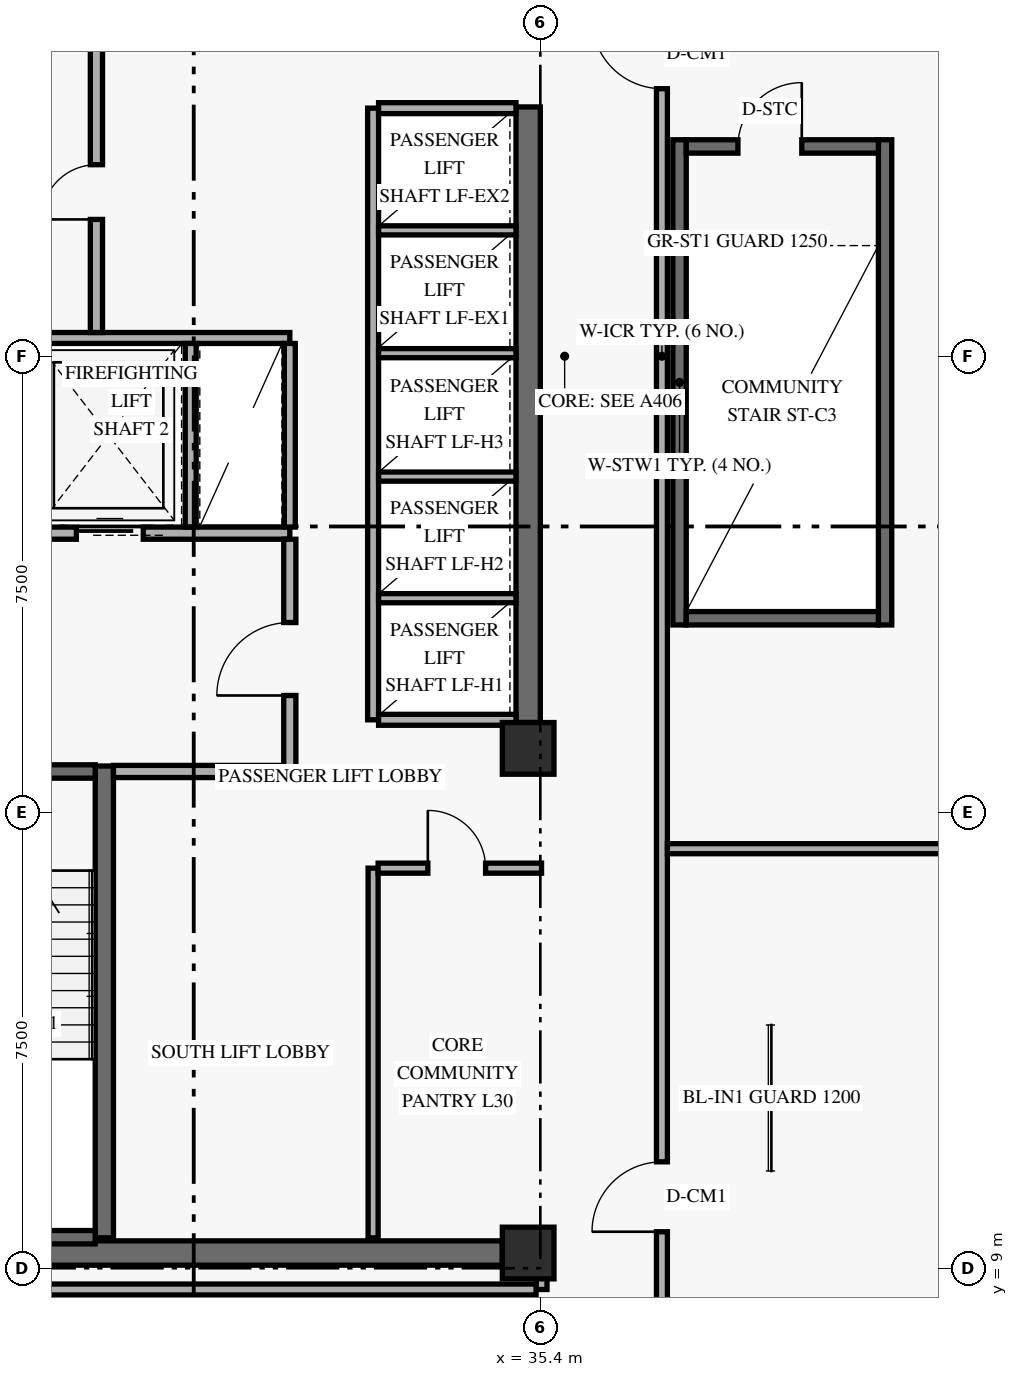
"""IFC4 building model, lengths in metres.
Left out: names, types, materials, properties, quantities, classifications, styles, units other than length and angle.
Written with IfcOpenShell. Run it as: python <this file> out.ifc"""

import sys

from ifc_helpers import new_model, si_unit, direction, frame, frame_2d, origin, origin_2d, place, context, subcontext, project, spatial, rectangle, extrude, element, fill, save


model = new_model("IFC4")
c1 = context("Model", 3, precision=1e-05, world=origin(), true_north=direction((0.0, 1.0)))
c2 = subcontext(c1, "Body", "Model", "MODEL_VIEW")
j1 = project(units=[si_unit("LENGTHUNIT", "METRE"), si_unit("PLANEANGLEUNIT", "RADIAN")], contexts=[c1])
p1 = place(None, origin())
s1 = spatial("IfcSite", under=j1, at=p1, CompositionType="ELEMENT")
p2 = place(p1, origin())
s2 = spatial("IfcBuilding", under=s1, at=p2, CompositionType="ELEMENT")
p3 = place(p2, frame((0.0, 0.0, 117.0)))
s3 = spatial("IfcBuildingStorey", under=s2, at=p3, CompositionType="ELEMENT", Elevation=117.0)
p4 = place(p3, frame((35.2, 17.975, 0.0), z_axis=(0.0, 0.0, 1.0), x_axis=(0.0, 1.0, 0.0)))
e1 = element("IfcWall", 1, at=p4, inside=s3, PredefinedType="SHEAR", context=c2, shape_type="SweptSolid", body=[
    extrude(rectangle(XDim=10.125, YDim=0.4, at=frame_2d((5.062, 0.0))), origin(), (0.0, 0.0, 1.0), 3.349),
])
p5 = place(p3, frame((24.625, 9.25, 0.0), z_axis=(0.0, 0.0, 1.0), x_axis=(1.0, 0.0, 0.0)))
e2 = element("IfcWall", 2, at=p5, inside=s3, PredefinedType="SHEAR", context=c2, shape_type="SweptSolid", body=[
    extrude(rectangle(XDim=10.15, YDim=0.4, at=frame_2d((5.075, 0.0))), origin(), (0.0, 0.0, 1.0), 3.96),
])
p6 = place(p3, frame((28.23, 9.5, 0.0), z_axis=(0.0, 0.0, 1.0), x_axis=(0.0, 1.0, 0.0)))
e3 = element("IfcWall", 3, at=p6, inside=s3, PredefinedType="SHEAR", context=c2, shape_type="SweptSolid", body=[
    extrude(rectangle(XDim=7.76, YDim=0.3, at=frame_2d((3.88, 0.0))), origin(), (0.0, 0.0, 1.0), 3.96),
])
p7 = place(p3, frame((24.92, 9.51, 0.0), z_axis=(0.0, 0.0, 1.0), x_axis=(1.0, 0.0, 0.0)))
e4 = element("IfcWall", 4, at=p7, inside=s3, PredefinedType="SHEAR", context=c2, shape_type="SweptSolid", body=[
    extrude(rectangle(XDim=3.16, YDim=0.22, at=frame_2d((1.58, 0.0))), origin(), (0.0, 0.0, 1.0), 3.96),
])
p8 = place(p3, frame((24.92, 17.17, 0.0), z_axis=(0.0, 0.0, 1.0), x_axis=(1.0, 0.0, 0.0)))
e5 = element("IfcWall", 5, at=p8, inside=s3, PredefinedType="SHEAR", context=c2, shape_type="SweptSolid", body=[
    extrude(rectangle(XDim=3.16, YDim=0.22, at=frame_2d((1.58, 0.0))), origin(), (0.0, 0.0, 1.0), 3.96),
])
p9 = place(p8, frame((0.78, 0.0, 0.0)))
e6 = element("IfcOpeningElement", 6, at=p9, cuts=e5, PredefinedType="OPENING", context=c2, shape_type="SweptSolid", body=[
    extrude(rectangle(XDim=1.05, YDim=2.15, at=frame_2d((0.525, 1.075))), frame((0.0, 0.12, 0.0), z_axis=(0.0, -1.0, 0.0), x_axis=(1.0, 0.0, 0.0)), (0.0, 0.0, 1.0), 0.24),
])
for number, where, z_axis, x_axis in (
    (7, (37.69, 19.58, 0.0), (0.0, 0.0, 1.0), (0.0, 1.0, 0.0)),
    (8, (41.07, 19.58, 0.0), (0.0, 0.0, 1.0), (0.0, 1.0, 0.0)),
):
    element("IfcWall", number, at=place(p3, frame(where, z_axis=z_axis, x_axis=x_axis)), inside=s3, PredefinedType="SHEAR", context=c2, shape_type="SweptSolid", body=[
        extrude(rectangle(XDim=7.98, YDim=0.22, at=frame_2d((3.99, 0.0))), origin(), (0.0, 0.0, 1.0), 3.96),
    ])
p10 = place(p3, frame((37.8, 19.69, 0.0), z_axis=(0.0, 0.0, 1.0), x_axis=(1.0, 0.0, 0.0)))
e9 = element("IfcWall", 9, at=p10, inside=s3, PredefinedType="SHEAR", context=c2, shape_type="SweptSolid", body=[
    extrude(rectangle(XDim=3.16, YDim=0.22, at=frame_2d((1.58, 0.0))), origin(), (0.0, 0.0, 1.0), 3.96),
])
p11 = place(p3, frame((37.8, 27.45, 0.0), z_axis=(0.0, 0.0, 1.0), x_axis=(1.0, 0.0, 0.0)))
e10 = element("IfcWall", 10, at=p11, inside=s3, PredefinedType="SHEAR", context=c2, shape_type="SweptSolid", body=[
    extrude(rectangle(XDim=3.16, YDim=0.22, at=frame_2d((1.58, 0.0))), origin(), (0.0, 0.0, 1.0), 3.96),
])
p12 = place(p11, frame((0.85, 0.0, 0.0)))
e11 = element("IfcOpeningElement", 11, at=p12, cuts=e10, PredefinedType="OPENING", context=c2, shape_type="SweptSolid", body=[
    extrude(rectangle(XDim=1.05, YDim=2.15, at=frame_2d((0.525, 1.075))), frame((0.0, 0.12, 0.0), z_axis=(0.0, -1.0, 0.0), x_axis=(1.0, 0.0, 0.0)), (0.0, 0.0, 1.0), 0.24),
])
for number, where, z_axis, x_axis in (
    (12, (35.2, 9.25, 0.0), (0.0, 0.0, 1.0), (1.0, 0.0, 0.0)),
    (13, (35.2, 17.55, 0.0), (0.0, 0.0, 1.0), (1.0, 0.0, 0.0)),
):
    element("IfcColumn", number, at=place(p3, frame(where, z_axis=z_axis, x_axis=x_axis)), inside=s3, PredefinedType="COLUMN", context=c2, shape_type="SweptSolid", body=[
        extrude(rectangle(XDim=0.85, YDim=0.85, at=origin_2d()), origin(), (0.0, 0.0, 1.0), 4.2),
    ])
p13 = place(p3, frame((24.45, 21.09, 0.0), z_axis=(0.0, 0.0, 1.0), x_axis=(1.0, 0.0, 0.0)))
e14 = element("IfcWall", 14, at=p13, inside=s3, PredefinedType="STANDARD", context=c2, shape_type="SweptSolid", body=[
    extrude(rectangle(XDim=6.83, YDim=0.2, at=frame_2d((3.415, 0.0))), origin(), (0.0, 0.0, 1.0), 3.96),
])
p14 = place(p13, frame((0.72, 0.0, 0.0)))
e15 = element("IfcOpeningElement", 15, at=p14, cuts=e14, PredefinedType="OPENING", context=c2, shape_type="SweptSolid", body=[
    extrude(rectangle(XDim=1.1, YDim=2.2, at=frame_2d((0.55, 1.1))), frame((0.0, 0.11, 0.0), z_axis=(0.0, -1.0, 0.0), x_axis=(1.0, 0.0, 0.0)), (0.0, 0.0, 1.0), 0.22),
])
p15 = place(p13, frame((3.32, 0.0, 0.0)))
e16 = element("IfcOpeningElement", 16, at=p15, cuts=e14, PredefinedType="OPENING", context=c2, shape_type="SweptSolid", body=[
    extrude(rectangle(XDim=1.1, YDim=2.2, at=frame_2d((0.55, 1.1))), frame((0.0, 0.11, 0.0), z_axis=(0.0, -1.0, 0.0), x_axis=(1.0, 0.0, 0.0)), (0.0, 0.0, 1.0), 0.22),
])
p16 = place(p3, frame((28.38, 17.17, 0.0), z_axis=(0.0, 0.0, 1.0), x_axis=(1.0, 0.0, 0.0)))
e17 = element("IfcWall", 17, at=p16, inside=s3, PredefinedType="STANDARD", context=c2, shape_type="SweptSolid", body=[
    extrude(rectangle(XDim=2.9, YDim=0.2, at=frame_2d((1.45, 0.0))), origin(), (0.0, 0.0, 1.0), 3.96),
])
p17 = place(p3, frame((31.28, 17.07, 0.0), z_axis=(0.0, 0.0, 1.0), x_axis=(0.0, 1.0, 0.0)))
e18 = element("IfcWall", 18, at=p17, inside=s3, PredefinedType="STANDARD", context=c2, shape_type="SweptSolid", body=[
    extrude(rectangle(XDim=3.92, YDim=0.2, at=frame_2d((1.96, 0.0))), origin(), (0.0, 0.0, 1.0), 3.331),
])
p18 = place(p17, frame((1.35, 0.0, 0.0)))
e19 = element("IfcOpeningElement", 19, at=p18, cuts=e18, PredefinedType="OPENING", context=c2, shape_type="SweptSolid", body=[
    extrude(rectangle(XDim=1.2, YDim=2.15, at=frame_2d((0.6, 1.075))), frame((0.0, 0.11, 0.0), z_axis=(0.0, -1.0, 0.0), x_axis=(1.0, 0.0, 0.0)), (0.0, 0.0, 1.0), 0.22),
])
p19 = place(p3, frame((24.45, 24.3, 0.0), z_axis=(0.0, 0.0, 1.0), x_axis=(1.0, 0.0, 0.0)))
e20 = element("IfcWall", 20, at=p19, inside=s3, PredefinedType="STANDARD", context=c2, shape_type="SweptSolid", body=[
    extrude(rectangle(XDim=6.83, YDim=0.18, at=frame_2d((3.415, 0.0))), origin(), (0.0, 0.0, 1.0), 3.96),
])
for number, where, z_axis, x_axis in (
    (21, (29.65, 21.19, 0.0), (0.0, 0.0, 1.0), (0.0, 1.0, 0.0)),
    (22, (31.28, 21.19, 0.0), (0.0, 0.0, 1.0), (0.0, 1.0, 0.0)),
):
    element("IfcWall", number, at=place(p3, frame(where, z_axis=z_axis, x_axis=x_axis)), inside=s3, PredefinedType="STANDARD", context=c2, shape_type="SweptSolid", body=[
        extrude(rectangle(XDim=3.02, YDim=0.18, at=frame_2d((1.51, 0.0))), origin(), (0.0, 0.0, 1.0), 3.96),
    ])
p20 = place(p3, frame((28.1, 24.39, 0.0), z_axis=(0.0, 0.0, 1.0), x_axis=(0.0, 1.0, 0.0)))
e23 = element("IfcWall", 23, at=p20, inside=s3, PredefinedType="STANDARD", context=c2, shape_type="SweptSolid", body=[
    extrude(rectangle(XDim=4.75, YDim=0.2, at=frame_2d((2.375, 0.0))), origin(), (0.0, 0.0, 1.0), 3.96),
])
p21 = place(p20, frame((1.86, 0.0, 0.0)))
e24 = element("IfcOpeningElement", 24, at=p21, cuts=e23, PredefinedType="OPENING", context=c2, shape_type="SweptSolid", body=[
    extrude(rectangle(XDim=0.9, YDim=2.1, at=frame_2d((0.45, 1.05))), frame((0.0, 0.11, 0.0), z_axis=(0.0, -1.0, 0.0), x_axis=(1.0, 0.0, 0.0)), (0.0, 0.0, 1.0), 0.22),
])
p22 = place(p3, frame((32.65, 18.02, 0.0), z_axis=(0.0, 0.0, 1.0), x_axis=(0.0, 1.0, 0.0)))
e25 = element("IfcWall", 25, at=p22, inside=s3, PredefinedType="STANDARD", context=c2, shape_type="SweptSolid", body=[
    extrude(rectangle(XDim=10.06, YDim=0.18, at=frame_2d((5.03, 0.0))), origin(), (0.0, 0.0, 1.0), 3.96),
])
for number, where, z_axis, x_axis in (
    (26, (32.74, 18.02, 0.0), (0.0, 0.0, 1.0), (1.0, 0.0, 0.0)),
    (27, (32.74, 28.08, 0.0), (0.0, 0.0, 1.0), (1.0, 0.0, 0.0)),
):
    element("IfcWall", number, at=place(p3, frame(where, z_axis=z_axis, x_axis=x_axis)), inside=s3, PredefinedType="STANDARD", context=c2, shape_type="SweptSolid", body=[
        extrude(rectangle(XDim=2.26, YDim=0.18, at=frame_2d((1.13, 0.0))), origin(), (0.0, 0.0, 1.0), 3.96),
    ])
for number, where, z_axis, x_axis in (
    (28, (32.74, 20.02, 0.0), (0.0, 0.0, 1.0), (1.0, 0.0, 0.0)),
    (29, (32.74, 22.02, 0.0), (0.0, 0.0, 1.0), (1.0, 0.0, 0.0)),
    (30, (32.74, 24.05, 0.0), (0.0, 0.0, 1.0), (1.0, 0.0, 0.0)),
    (31, (32.74, 26.07, 0.0), (0.0, 0.0, 1.0), (1.0, 0.0, 0.0)),
):
    element("IfcWall", number, at=place(p3, frame(where, z_axis=z_axis, x_axis=x_axis)), inside=s3, PredefinedType="STANDARD", context=c2, shape_type="SweptSolid", body=[
        extrude(rectangle(XDim=2.26, YDim=0.15, at=frame_2d((1.13, 0.0))), origin(), (0.0, 0.0, 1.0), 3.96),
    ])
p23 = place(p3, frame((37.4, 6.8, 0.0), z_axis=(0.0, 0.0, 1.0), x_axis=(0.0, 1.0, 0.0)))
e32 = element("IfcWall", 32, at=p23, inside=s3, PredefinedType="STANDARD", context=c2, shape_type="SweptSolid", body=[
    extrude(rectangle(XDim=34.4, YDim=0.18, at=frame_2d((17.2, 0.0))), origin(), (0.0, 0.0, 1.0), 3.331),
])
p24 = place(p23, frame((25.57, 0.0, 0.0)))
e33 = element("IfcOpeningElement", 33, at=p24, cuts=e32, PredefinedType="OPENING", context=c2, shape_type="SweptSolid", body=[
    extrude(rectangle(XDim=0.92, YDim=2.14, at=frame_2d((0.46, 1.07))), frame((0.0, 0.1, 0.0), z_axis=(0.0, -1.0, 0.0), x_axis=(1.0, 0.0, 0.0)), (0.0, 0.0, 1.0), 0.2),
])
p25 = place(p23, frame((32.46, 0.0, 0.0)))
e34 = element("IfcOpeningElement", 34, at=p25, cuts=e32, PredefinedType="OPENING", context=c2, shape_type="SweptSolid", body=[
    extrude(rectangle(XDim=0.95, YDim=2.14, at=frame_2d((0.475, 1.07))), frame((0.0, 0.1, 0.0), z_axis=(0.0, -1.0, 0.0), x_axis=(1.0, 0.0, 0.0)), (0.0, 0.0, 1.0), 0.2),
])
p26 = place(p23, frame((2.8, 0.0, 0.0)))
e35 = element("IfcOpeningElement", 35, at=p26, cuts=e32, PredefinedType="OPENING", context=c2, shape_type="SweptSolid", body=[
    extrude(rectangle(XDim=1.15, YDim=2.15, at=frame_2d((0.575, 1.075))), frame((0.0, 0.1, 0.0), z_axis=(0.0, -1.0, 0.0), x_axis=(1.0, 0.0, 0.0)), (0.0, 0.0, 1.0), 0.2),
])
p27 = place(p23, frame((21.6, 0.0, 0.0)))
e36 = element("IfcOpeningElement", 36, at=p27, cuts=e32, PredefinedType="OPENING", context=c2, shape_type="SweptSolid", body=[
    extrude(rectangle(XDim=1.15, YDim=2.15, at=frame_2d((0.575, 1.075))), frame((0.0, 0.1, 0.0), z_axis=(0.0, -1.0, 0.0), x_axis=(1.0, 0.0, 0.0)), (0.0, 0.0, 1.0), 0.2),
])
p28 = place(p3, frame((35.42, 8.65, 0.0), z_axis=(0.0, 0.0, 1.0), x_axis=(0.0, 1.0, 0.0)))
e37 = element("IfcWall", 37, at=p28, inside=s3, PredefinedType="STANDARD", context=c2, shape_type="SweptSolid", body=[
    extrude(rectangle(XDim=0.6, YDim=0.18, at=frame_2d((0.3, 0.0))), origin(), (0.0, 0.0, 1.0), 3.331),
])
p29 = place(p3, frame((37.49, 15.9, 0.0), z_axis=(0.0, 0.0, 1.0), x_axis=(1.0, 0.0, 0.0)))
e38 = element("IfcWall", 38, at=p29, inside=s3, PredefinedType="PARTITIONING", context=c2, shape_type="SweptSolid", body=[
    extrude(rectangle(XDim=15.83, YDim=0.165, at=frame_2d((7.915, 0.0))), origin(), (0.0, 0.0, 1.0), 3.331),
])
p30 = place(p3, frame((32.65, 9.5, 0.0), z_axis=(0.0, 0.0, 1.0), x_axis=(0.0, 1.0, 0.0)))
e39 = element("IfcWall", 39, at=p30, inside=s3, PredefinedType="PARTITIONING", context=c2, shape_type="SweptSolid", body=[
    extrude(rectangle(XDim=6.08, YDim=0.165, at=frame_2d((3.04, 0.0))), origin(), (0.0, 0.0, 1.0), 3.96),
])
p31 = place(p3, frame((32.732, 15.58, 0.0), z_axis=(0.0, 0.0, 1.0), x_axis=(1.0, 0.0, 0.0)))
e40 = element("IfcWall", 40, at=p31, inside=s3, PredefinedType="PARTITIONING", context=c2, shape_type="SweptSolid", body=[
    extrude(rectangle(XDim=2.688, YDim=0.165, at=frame_2d((1.344, 0.0))), origin(), (0.0, 0.0, 1.0), 3.331),
])
p32 = place(p31, frame((0.817, 0.0, 0.0)))
e41 = element("IfcOpeningElement", 41, at=p32, cuts=e40, PredefinedType="OPENING", context=c2, shape_type="SweptSolid", body=[
    extrude(rectangle(XDim=0.95, YDim=2.15, at=frame_2d((0.475, 1.075))), frame((0.0, 0.093, 0.0), z_axis=(0.0, -1.0, 0.0), x_axis=(1.0, 0.0, 0.0)), (0.0, 0.0, 1.0), 0.185),
])
p33 = place(p3, frame((23.85, 8.65, 0.0), z_axis=(0.0, 0.0, 1.0), x_axis=(1.0, 0.0, 0.0)))
e42 = element("IfcWall", 42, at=p33, inside=s3, PredefinedType="STANDARD", context=c2, shape_type="SweptSolid", body=[
    extrude(rectangle(XDim=11.48, YDim=0.18, at=frame_2d((5.74, 0.0))), origin(), (0.0, 0.0, 1.0), 3.331),
])
p34 = place(p15, origin())
e43 = element("IfcDoor", 43, at=p34, inside=s3, OperationType="SLIDING_TO_LEFT", PredefinedType="DOOR", context=c2, shape_type="SweptSolid", body=[
    extrude(rectangle(XDim=1.1, YDim=2.2, at=frame_2d((0.55, 1.1))), frame((0.0, 0.025, 0.0), z_axis=(0.0, -1.0, 0.0), x_axis=(1.0, 0.0, 0.0)), (0.0, 0.0, 1.0), 0.05),
])
fill(e16, e43)
p35 = place(p18, origin())
e44 = element("IfcDoor", 44, at=p35, inside=s3, OperationType="SINGLE_SWING_LEFT", PredefinedType="DOOR", context=c2, shape_type="SweptSolid", body=[
    extrude(rectangle(XDim=1.2, YDim=2.15, at=frame_2d((0.6, 1.075))), frame((0.0, 0.025, 0.0), z_axis=(0.0, -1.0, 0.0), x_axis=(1.0, 0.0, 0.0)), (0.0, 0.0, 1.0), 0.05),
])
fill(e19, e44)
p36 = place(p21, origin())
e45 = element("IfcDoor", 45, at=p36, inside=s3, OperationType="SINGLE_SWING_LEFT", PredefinedType="DOOR", context=c2, shape_type="SweptSolid", body=[
    extrude(rectangle(XDim=0.9, YDim=2.1, at=frame_2d((0.45, 1.05))), frame((0.0, 0.025, 0.0), z_axis=(0.0, -1.0, 0.0), x_axis=(1.0, 0.0, 0.0)), (0.0, 0.0, 1.0), 0.05),
])
fill(e24, e45)
p37 = place(p12, frame((1.05, 0.0, 0.0), z_axis=(0.0, 0.0, 1.0), x_axis=(-1.0, 0.0, 0.0)))
e46 = element("IfcDoor", 46, at=p37, inside=s3, OperationType="SINGLE_SWING_LEFT", PredefinedType="DOOR", context=c2, shape_type="SweptSolid", body=[
    extrude(rectangle(XDim=1.05, YDim=2.15, at=frame_2d((0.525, 1.075))), frame((0.0, 0.025, 0.0), z_axis=(0.0, -1.0, 0.0), x_axis=(1.0, 0.0, 0.0)), (0.0, 0.0, 1.0), 0.05),
])
fill(e11, e46)
p38 = place(p32, origin())
e47 = element("IfcDoor", 47, at=p38, inside=s3, OperationType="SINGLE_SWING_LEFT", PredefinedType="DOOR", context=c2, shape_type="SweptSolid", body=[
    extrude(rectangle(XDim=0.95, YDim=2.15, at=frame_2d((0.475, 1.075))), frame((0.0, 0.025, 0.0), z_axis=(0.0, -1.0, 0.0), x_axis=(1.0, 0.0, 0.0)), (0.0, 0.0, 1.0), 0.05),
])
fill(e41, e47)
p39 = place(p26, origin())
e48 = element("IfcDoor", 48, at=p39, inside=s3, OperationType="SINGLE_SWING_LEFT", PredefinedType="DOOR", context=c2, shape_type="SweptSolid", body=[
    extrude(rectangle(XDim=1.15, YDim=2.15, at=frame_2d((0.575, 1.075))), frame((0.0, 0.025, 0.0), z_axis=(0.0, -1.0, 0.0), x_axis=(1.0, 0.0, 0.0)), (0.0, 0.0, 1.0), 0.05),
])
fill(e35, e48)
p40 = place(p27, origin())
e49 = element("IfcDoor", 49, at=p40, inside=s3, OperationType="SINGLE_SWING_RIGHT", PredefinedType="DOOR", context=c2, shape_type="SweptSolid", body=[
    extrude(rectangle(XDim=1.15, YDim=2.15, at=frame_2d((0.575, 1.075))), frame((0.0, 0.025, 0.0), z_axis=(0.0, -1.0, 0.0), x_axis=(1.0, 0.0, 0.0)), (0.0, 0.0, 1.0), 0.05),
])
fill(e36, e49)
save(model, sys.argv[1])
